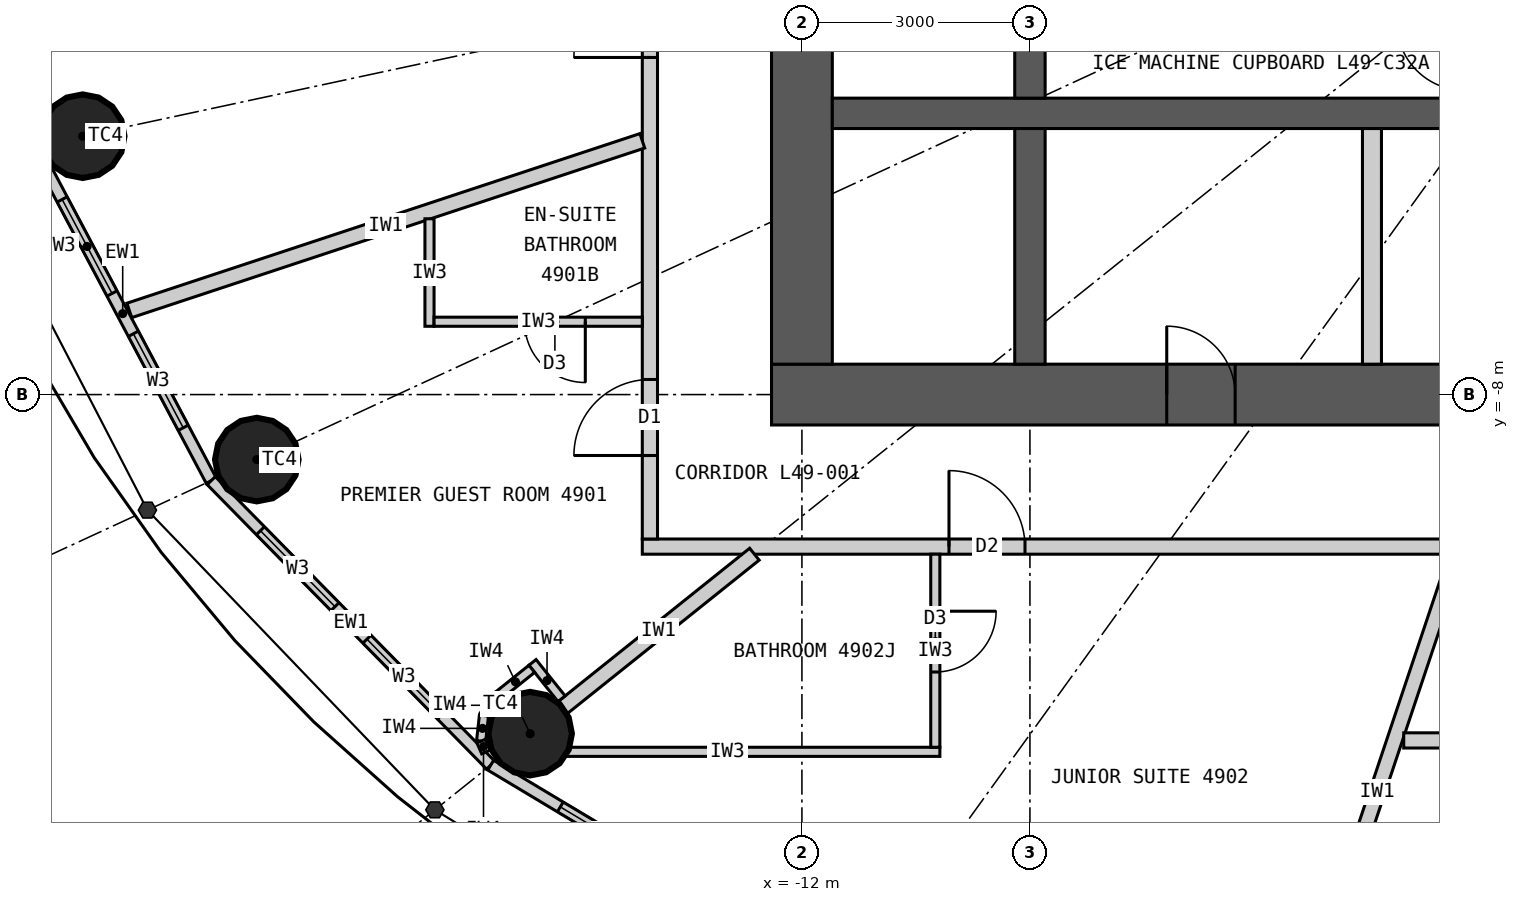
"""IFC4 building model, lengths in metres.
Left out: names, types, materials, properties, quantities, classifications, styles, units other than length and angle.
Written with IfcOpenShell. Run it as: python <this file> out.ifc"""

import sys

from ifc_helpers import new_model, si_unit, direction, frame, frame_2d, origin, origin_2d, place, context, subcontext, project, spatial, rectangle, circle, extrude, clip, halfspace, element, fill, save


model = new_model("IFC4")
c1 = context("Model", 3, precision=1e-05, world=origin(), true_north=direction((0.0, 1.0)))
c2 = subcontext(c1, "Body", "Model", "MODEL_VIEW")
j1 = project(units=[si_unit("LENGTHUNIT", "METRE"), si_unit("PLANEANGLEUNIT", "RADIAN")], contexts=[c1])
p1 = place(None, origin())
s1 = spatial("IfcSite", under=j1, at=p1, CompositionType="ELEMENT")
p2 = place(p1, origin())
s2 = spatial("IfcBuilding", under=s1, at=p2, CompositionType="ELEMENT")
p3 = place(p2, frame((0.0, 0.0, 183.0)))
s3 = spatial("IfcBuildingStorey", under=s2, at=p3, CompositionType="ELEMENT", Elevation=183.0)
for number, where, z_axis, x_axis in (
    (1, (-21.463, -4.601, 0.0), (0.0, 0.0, 1.0), (1.0, 0.0, 0.0)),
    (2, (-19.172, -8.855, 0.0), (0.0, 0.0, 1.0), (1.0, 0.0, 0.0)),
    (3, (-15.576, -12.461, 0.0), (0.0, 0.0, 1.0), (1.0, 0.0, 0.0)),
):
    element("IfcColumn", number, at=place(p3, frame(where, z_axis=z_axis, x_axis=x_axis)), inside=s3, PredefinedType="COLUMN", context=c2, shape_type="Clipping", body=[
        clip(extrude(circle(Radius=0.55, at=origin_2d()), origin(), (0.0, 0.0, 1.0), 3.3), halfspace(frame((0.0, 0.0, 2.25), z_axis=(0.0, 0.0, 1.0), x_axis=(1.0, 0.0, 0.0)), False)),
    ])
p4 = place(p3, frame((12.4, -8.0, 0.0), z_axis=(0.0, 0.0, 1.0), x_axis=(-1.0, 0.0, 0.0)))
e4 = element("IfcWall", 4, at=p4, inside=s3, PredefinedType="SHEAR", context=c2, shape_type="SweptSolid", body=[
    extrude(rectangle(XDim=24.8, YDim=0.8, at=frame_2d((12.4, 0.0))), origin(), (0.0, 0.0, 1.0), 3.3),
])
p5 = place(p4, frame((11.1, 0.0, 0.0)))
e5 = element("IfcOpeningElement", 5, at=p5, cuts=e4, PredefinedType="OPENING", context=c2, shape_type="SweptSolid", body=[
    extrude(rectangle(XDim=1.2, YDim=2.2, at=frame_2d((0.6, 1.1))), frame((0.0, 0.41, 0.0), z_axis=(0.0, -1.0, 0.0), x_axis=(1.0, 0.0, 0.0)), (0.0, 0.0, 1.0), 0.82),
])
p6 = place(p4, frame((18.7, 0.0, 0.0)))
e6 = element("IfcOpeningElement", 6, at=p6, cuts=e4, PredefinedType="OPENING", context=c2, shape_type="SweptSolid", body=[
    extrude(rectangle(XDim=0.9, YDim=2.2, at=frame_2d((0.45, 1.1))), frame((0.0, 0.41, 0.0), z_axis=(0.0, -1.0, 0.0), x_axis=(1.0, 0.0, 0.0)), (0.0, 0.0, 1.0), 0.82),
])
p7 = place(p3, frame((-12.0, 7.6, 0.0), z_axis=(0.0, 0.0, 1.0), x_axis=(0.0, -1.0, 0.0)))
e7 = element("IfcWall", 7, at=p7, inside=s3, PredefinedType="SHEAR", context=c2, shape_type="SweptSolid", body=[
    extrude(rectangle(XDim=15.2, YDim=0.8, at=frame_2d((7.6, 0.0))), origin(), (0.0, 0.0, 1.0), 3.3),
])
p8 = place(p7, frame((6.7, 0.0, 0.0)))
e8 = element("IfcOpeningElement", 8, at=p8, cuts=e7, PredefinedType="OPENING", context=c2, shape_type="SweptSolid", body=[
    extrude(rectangle(XDim=1.8, YDim=2.2, at=frame_2d((0.9, 1.1))), frame((0.0, 0.41, 0.0), z_axis=(0.0, -1.0, 0.0), x_axis=(1.0, 0.0, 0.0)), (0.0, 0.0, 1.0), 0.82),
])
p9 = place(p3, frame((-11.6, -4.3, 0.0), z_axis=(0.0, 0.0, 1.0), x_axis=(1.0, 0.0, 0.0)))
e9 = element("IfcWall", 9, at=p9, inside=s3, PredefinedType="SHEAR", context=c2, shape_type="SweptSolid", body=[
    extrude(rectangle(XDim=23.2, YDim=0.4, at=frame_2d((11.6, 0.0))), origin(), (0.0, 0.0, 1.0), 3.3),
])
p10 = place(p3, frame((-9.0, -4.1, 0.0), z_axis=(0.0, 0.0, 1.0), x_axis=(0.0, 1.0, 0.0)))
e10 = element("IfcWall", 10, at=p10, inside=s3, PredefinedType="SHEAR", context=c2, shape_type="SweptSolid", body=[
    extrude(rectangle(XDim=2.35, YDim=0.4, at=frame_2d((1.175, 0.0))), origin(), (0.0, 0.0, 1.0), 3.3),
])
p11 = place(p3, frame((-9.0, -7.6, 0.0), z_axis=(0.0, 0.0, 1.0), x_axis=(0.0, 1.0, 0.0)))
e11 = element("IfcWall", 11, at=p11, inside=s3, PredefinedType="SHEAR", context=c2, shape_type="SweptSolid", body=[
    extrude(rectangle(XDim=3.1, YDim=0.4, at=frame_2d((1.55, 0.0))), origin(), (0.0, 0.0, 1.0), 3.3),
])
p12 = place(p3, frame((-4.5, -7.6, 0.0), z_axis=(0.0, 0.0, 1.0), x_axis=(0.0, 1.0, 0.0)))
e12 = element("IfcWall", 12, at=p12, inside=s3, PredefinedType="PARTITIONING", context=c2, shape_type="SweptSolid", body=[
    extrude(rectangle(XDim=3.1, YDim=0.25, at=frame_2d((1.55, 0.0))), origin(), (0.0, 0.0, 1.0), 3.3),
])
p13 = place(p3, frame((-22.102, -4.738, 0.0), z_axis=(0.0, 0.0, 1.0), x_axis=(0.468428906714, -0.883501193748, 0.0)))
e13 = element("IfcWall", 13, at=p13, inside=s3, PredefinedType="ELEMENTEDWALL", context=c2, shape_type="SweptSolid", body=[
    extrude(rectangle(XDim=4.974, YDim=0.15, at=frame_2d((2.487, 0.0))), origin(), (0.0, 0.0, 1.0), 3.05),
])
p14 = place(p13, frame((0.787, 0.0, 0.9)))
e14 = element("IfcOpeningElement", 14, at=p14, cuts=e13, PredefinedType="OPENING", context=c2, shape_type="SweptSolid", body=[
    extrude(rectangle(XDim=1.4, YDim=1.9, at=frame_2d((0.7, 0.95))), frame((0.0, 0.085, 0.0), z_axis=(0.0, -1.0, 0.0), x_axis=(1.0, 0.0, 0.0)), (0.0, 0.0, 1.0), 0.17),
])
p15 = place(p13, frame((2.787, 0.0, 0.9)))
e15 = element("IfcOpeningElement", 15, at=p15, cuts=e13, PredefinedType="OPENING", context=c2, shape_type="SweptSolid", body=[
    extrude(rectangle(XDim=1.4, YDim=1.9, at=frame_2d((0.7, 0.95))), frame((0.0, 0.085, 0.0), z_axis=(0.0, -1.0, 0.0), x_axis=(1.0, 0.0, 0.0)), (0.0, 0.0, 1.0), 0.17),
])
p16 = place(p3, frame((-19.772, -9.132, 0.0), z_axis=(0.0, 0.0, 1.0), x_axis=(0.700727467776, -0.71342905457, 0.0)))
e16 = element("IfcWall", 16, at=p16, inside=s3, PredefinedType="ELEMENTEDWALL", context=c2, shape_type="SweptSolid", body=[
    extrude(rectangle(XDim=5.247, YDim=0.15, at=frame_2d((2.624, 0.0))), origin(), (0.0, 0.0, 1.0), 3.05),
])
p17 = place(p16, frame((0.924, 0.0, 0.9)))
e17 = element("IfcOpeningElement", 17, at=p17, cuts=e16, PredefinedType="OPENING", context=c2, shape_type="SweptSolid", body=[
    extrude(rectangle(XDim=1.4, YDim=1.9, at=frame_2d((0.7, 0.95))), frame((0.0, 0.085, 0.0), z_axis=(0.0, -1.0, 0.0), x_axis=(1.0, 0.0, 0.0)), (0.0, 0.0, 1.0), 0.17),
])
p18 = place(p16, frame((2.924, 0.0, 0.9)))
e18 = element("IfcOpeningElement", 18, at=p18, cuts=e16, PredefinedType="OPENING", context=c2, shape_type="SweptSolid", body=[
    extrude(rectangle(XDim=1.4, YDim=1.9, at=frame_2d((0.7, 0.95))), frame((0.0, 0.085, 0.0), z_axis=(0.0, -1.0, 0.0), x_axis=(1.0, 0.0, 0.0)), (0.0, 0.0, 1.0), 0.17),
])
p19 = place(p3, frame((-16.095, -12.876, 0.0), z_axis=(0.0, 0.0, 1.0), x_axis=(0.857695199231, -0.514158482587, 0.0)))
e19 = element("IfcWall", 19, at=p19, inside=s3, PredefinedType="ELEMENTEDWALL", context=c2, shape_type="SweptSolid", body=[
    extrude(rectangle(XDim=5.536, YDim=0.15, at=frame_2d((2.768, 0.0))), origin(), (0.0, 0.0, 1.0), 3.05),
])
p20 = place(p19, frame((1.068, 0.0, 0.9)))
e20 = element("IfcOpeningElement", 20, at=p20, cuts=e19, PredefinedType="OPENING", context=c2, shape_type="SweptSolid", body=[
    extrude(rectangle(XDim=1.4, YDim=1.9, at=frame_2d((0.7, 0.95))), frame((0.0, 0.085, 0.0), z_axis=(0.0, -1.0, 0.0), x_axis=(1.0, 0.0, 0.0)), (0.0, 0.0, 1.0), 0.17),
])
p21 = place(p19, frame((3.068, 0.0, 0.9)))
e21 = element("IfcOpeningElement", 21, at=p21, cuts=e19, PredefinedType="OPENING", context=c2, shape_type="SweptSolid", body=[
    extrude(rectangle(XDim=1.4, YDim=1.9, at=frame_2d((0.7, 0.95))), frame((0.0, 0.085, 0.0), z_axis=(0.0, -1.0, 0.0), x_axis=(1.0, 0.0, 0.0)), (0.0, 0.0, 1.0), 0.17),
])
p22 = place(p3, frame((14.1, -10.0, 0.0), z_axis=(0.0, 0.0, 1.0), x_axis=(-1.0, 0.0, 0.0)))
e22 = element("IfcWall", 22, at=p22, inside=s3, PredefinedType="PARTITIONING", context=c2, shape_type="SweptSolid", body=[
    extrude(rectangle(XDim=28.2, YDim=0.2, at=frame_2d((14.1, 0.0))), origin(), (0.0, 0.0, 1.0), 3.05),
])
p23 = place(p22, frame((23.165, 0.0, 0.0)))
e23 = element("IfcOpeningElement", 23, at=p23, cuts=e22, PredefinedType="OPENING", context=c2, shape_type="SweptSolid", body=[
    extrude(rectangle(XDim=1.0, YDim=2.2, at=frame_2d((0.5, 1.1))), frame((0.0, 0.11, 0.0), z_axis=(0.0, -1.0, 0.0), x_axis=(1.0, 0.0, 0.0)), (0.0, 0.0, 1.0), 0.22),
])
p24 = place(p22, frame((9.94, 0.0, 0.0)))
e24 = element("IfcOpeningElement", 24, at=p24, cuts=e22, PredefinedType="OPENING", context=c2, shape_type="SweptSolid", body=[
    extrude(rectangle(XDim=1.0, YDim=2.2, at=frame_2d((0.5, 1.1))), frame((0.0, 0.11, 0.0), z_axis=(0.0, -1.0, 0.0), x_axis=(1.0, 0.0, 0.0)), (0.0, 0.0, 1.0), 0.22),
])
p25 = place(p3, frame((-14.0, 9.9, 0.0), z_axis=(0.0, 0.0, 1.0), x_axis=(0.0, -1.0, 0.0)))
e25 = element("IfcWall", 25, at=p25, inside=s3, PredefinedType="PARTITIONING", context=c2, shape_type="SweptSolid", body=[
    extrude(rectangle(XDim=19.8, YDim=0.2, at=frame_2d((9.9, 0.0))), origin(), (0.0, 0.0, 1.0), 3.05),
])
p26 = place(p25, frame((17.701, 0.0, 0.0)))
e26 = element("IfcOpeningElement", 26, at=p26, cuts=e25, PredefinedType="OPENING", context=c2, shape_type="SweptSolid", body=[
    extrude(rectangle(XDim=1.0, YDim=2.2, at=frame_2d((0.5, 1.1))), frame((0.0, 0.11, 0.0), z_axis=(0.0, -1.0, 0.0), x_axis=(1.0, 0.0, 0.0)), (0.0, 0.0, 1.0), 0.22),
])
p27 = place(p25, frame((1.1, 0.0, 0.0)))
e27 = element("IfcOpeningElement", 27, at=p27, cuts=e25, PredefinedType="OPENING", context=c2, shape_type="SweptSolid", body=[
    extrude(rectangle(XDim=1.0, YDim=2.2, at=frame_2d((0.5, 1.1))), frame((0.0, 0.11, 0.0), z_axis=(0.0, -1.0, 0.0), x_axis=(1.0, 0.0, 0.0)), (0.0, 0.0, 1.0), 0.22),
])
p28 = place(p25, frame((6.574, 0.0, 0.0)))
e28 = element("IfcOpeningElement", 28, at=p28, cuts=e25, PredefinedType="OPENING", context=c2, shape_type="SweptSolid", body=[
    extrude(rectangle(XDim=1.0, YDim=2.2, at=frame_2d((0.5, 1.1))), frame((0.0, 0.11, 0.0), z_axis=(0.0, -1.0, 0.0), x_axis=(1.0, 0.0, 0.0)), (0.0, 0.0, 1.0), 0.22),
])
p29 = place(p25, frame((12.465, 0.0, 0.0)))
e29 = element("IfcOpeningElement", 29, at=p29, cuts=e25, PredefinedType="OPENING", context=c2, shape_type="SweptSolid", body=[
    extrude(rectangle(XDim=1.0, YDim=2.1, at=frame_2d((0.5, 1.05))), frame((0.0, 0.11, 0.0), z_axis=(0.0, -1.0, 0.0), x_axis=(1.0, 0.0, 0.0)), (0.0, 0.0, 1.0), 0.22),
])
p30 = place(p3, frame((-14.1, -4.661, 0.0), z_axis=(0.0, 0.0, 1.0), x_axis=(-0.949453216399, -0.313908569285, 0.0)))
e30 = element("IfcWall", 30, at=p30, inside=s3, PredefinedType="PARTITIONING", context=c2, shape_type="SweptSolid", body=[
    extrude(rectangle(XDim=7.109, YDim=0.2, at=frame_2d((3.554, 0.0))), origin(), (0.0, 0.0, 1.0), 3.05),
])
p31 = place(p3, frame((-12.625, -10.1, 0.0), z_axis=(0.0, 0.0, 1.0), x_axis=(-0.780876185034, -0.624685827954, 0.0)))
e31 = element("IfcWall", 31, at=p31, inside=s3, PredefinedType="PARTITIONING", context=c2, shape_type="SweptSolid", body=[
    extrude(rectangle(XDim=3.229, YDim=0.2, at=frame_2d((1.615, 0.0))), origin(), (0.0, 0.0, 1.0), 2.25),
])
p32 = place(p3, frame((-3.383, -10.1, 0.0), z_axis=(0.0, 0.0, 1.0), x_axis=(-0.317615120474, -0.948219718866, 0.0)))
e32 = element("IfcWall", 32, at=p32, inside=s3, PredefinedType="PARTITIONING", context=c2, shape_type="SweptSolid", body=[
    extrude(rectangle(XDim=6.597, YDim=0.2, at=frame_2d((3.299, 0.0))), origin(), (0.0, 0.0, 1.0), 2.15),
])
p33 = place(p3, frame((-16.9, -5.687, 0.0), z_axis=(0.0, 0.0, 1.0), x_axis=(0.0, -1.0, 0.0)))
e33 = element("IfcWall", 33, at=p33, inside=s3, PredefinedType="PARTITIONING", context=c2, shape_type="SweptSolid", body=[
    extrude(rectangle(XDim=1.414, YDim=0.12, at=frame_2d((0.707, 0.0))), origin(), (0.0, 0.0, 1.0), 3.05),
])
p34 = place(p3, frame((-14.1, -7.042, 0.0), z_axis=(0.0, 0.0, 1.0), x_axis=(-1.0, 0.0, 0.0)))
e34 = element("IfcWall", 34, at=p34, inside=s3, PredefinedType="PARTITIONING", context=c2, shape_type="SweptSolid", body=[
    extrude(rectangle(XDim=2.74, YDim=0.12, at=frame_2d((1.37, 0.0))), origin(), (0.0, 0.0, 1.0), 3.05),
])
p35 = place(p34, frame((0.75, 0.0, 0.0)))
e35 = element("IfcOpeningElement", 35, at=p35, cuts=e34, PredefinedType="OPENING", context=c2, shape_type="SweptSolid", body=[
    extrude(rectangle(XDim=0.8, YDim=2.1, at=frame_2d((0.4, 1.05))), frame((0.0, 0.07, 0.0), z_axis=(0.0, -1.0, 0.0), x_axis=(1.0, 0.0, 0.0)), (0.0, 0.0, 1.0), 0.14),
])
p36 = place(p3, frame((-15.775, -12.7, 0.0), z_axis=(0.0, 0.0, 1.0), x_axis=(1.0, 0.0, 0.0)))
e36 = element("IfcWall", 36, at=p36, inside=s3, PredefinedType="PARTITIONING", context=c2, shape_type="SweptSolid", body=[
    extrude(rectangle(XDim=5.59, YDim=0.12, at=frame_2d((2.795, 0.0))), origin(), (0.0, 0.0, 1.0), 3.05),
])
p37 = place(p3, frame((-10.245, -10.1, 0.0), z_axis=(0.0, 0.0, 1.0), x_axis=(0.0, -1.0, 0.0)))
e37 = element("IfcWall", 37, at=p37, inside=s3, PredefinedType="PARTITIONING", context=c2, shape_type="SweptSolid", body=[
    extrude(rectangle(XDim=2.54, YDim=0.12, at=frame_2d((1.27, 0.0))), origin(), (0.0, 0.0, 1.0), 3.05),
])
p38 = place(p37, frame((0.75, 0.0, 0.0)))
e38 = element("IfcOpeningElement", 38, at=p38, cuts=e37, PredefinedType="OPENING", context=c2, shape_type="SweptSolid", body=[
    extrude(rectangle(XDim=0.8, YDim=2.1, at=frame_2d((0.4, 1.05))), frame((0.0, 0.07, 0.0), z_axis=(0.0, -1.0, 0.0), x_axis=(1.0, 0.0, 0.0)), (0.0, 0.0, 1.0), 0.14),
])
p39 = place(p3, frame((-4.082, -12.55, 0.0), z_axis=(0.0, 0.0, 1.0), x_axis=(1.0, 0.0, 0.0)))
e39 = element("IfcWall", 39, at=p39, inside=s3, PredefinedType="PARTITIONING", context=c2, shape_type="SweptSolid", body=[
    extrude(rectangle(XDim=17.691, YDim=0.2, at=frame_2d((8.845, 0.0))), origin(), (0.0, 0.0, 1.0), 3.05),
])
p40 = place(p39, frame((2.449, 0.0, 0.0)))
e40 = element("IfcOpeningElement", 40, at=p40, cuts=e39, PredefinedType="OPENING", context=c2, shape_type="SweptSolid", body=[
    extrude(rectangle(XDim=0.8, YDim=2.1, at=frame_2d((0.4, 1.05))), frame((0.0, 0.11, 0.0), z_axis=(0.0, -1.0, 0.0), x_axis=(1.0, 0.0, 0.0)), (0.0, 0.0, 1.0), 0.22),
])
p41 = place(p39, frame((13.97, 0.0, 0.0)))
e41 = element("IfcOpeningElement", 41, at=p41, cuts=e39, PredefinedType="OPENING", context=c2, shape_type="SweptSolid", body=[
    extrude(rectangle(XDim=0.8, YDim=2.1, at=frame_2d((0.4, 1.05))), frame((0.0, 0.11, 0.0), z_axis=(0.0, -1.0, 0.0), x_axis=(1.0, 0.0, 0.0)), (0.0, 0.0, 1.0), 0.22),
])
p42 = place(p39, frame((8.42, 0.0, 0.0)))
e42 = element("IfcOpeningElement", 42, at=p42, cuts=e39, PredefinedType="OPENING", context=c2, shape_type="SweptSolid", body=[
    extrude(rectangle(XDim=0.9, YDim=2.1, at=frame_2d((0.45, 1.05))), frame((0.0, 0.11, 0.0), z_axis=(0.0, -1.0, 0.0), x_axis=(1.0, 0.0, 0.0)), (0.0, 0.0, 1.0), 0.22),
])
p43 = place(p3, frame((-15.162, -12.002, 0.0), z_axis=(0.0, 0.0, 1.0), x_axis=(-0.624597762427, 0.780946627607, 0.0)))
e43 = element("IfcWall", 43, at=p43, inside=s3, PredefinedType="PARTITIONING", context=c2, shape_type="SweptSolid", body=[
    extrude(rectangle(XDim=0.612, YDim=0.12, at=frame_2d((0.306, 0.0))), origin(), (0.0, 0.0, 1.0), 3.05),
])
p44 = place(p3, frame((-15.554, -11.608, 0.0), z_axis=(0.0, 0.0, 1.0), x_axis=(-0.780695577787, -0.624911525597, 0.0)))
e44 = element("IfcWall", 44, at=p44, inside=s3, PredefinedType="PARTITIONING", context=c2, shape_type="SweptSolid", body=[
    extrude(rectangle(XDim=0.55, YDim=0.12, at=frame_2d((0.275, 0.0))), origin(), (0.0, 0.0, 1.0), 3.05),
])
p45 = place(p3, frame((-15.984, -11.952, 0.0), z_axis=(0.0, 0.0, 1.0), x_axis=(-0.592335221171, -0.805691619517, 0.0)))
e45 = element("IfcWall", 45, at=p45, inside=s3, PredefinedType="PARTITIONING", context=c2, shape_type="SweptSolid", body=[
    extrude(rectangle(XDim=0.338, YDim=0.12, at=frame_2d((0.169, 0.0))), origin(), (0.0, 0.0, 1.0), 3.05),
])
p46 = place(p3, frame((-16.184, -12.224, 0.0), z_axis=(0.0, 0.0, 1.0), x_axis=(-0.110669692975, -0.993857242795, 0.0)))
e46 = element("IfcWall", 46, at=p46, inside=s3, PredefinedType="PARTITIONING", context=c2, shape_type="SweptSolid", body=[
    extrude(rectangle(XDim=0.337, YDim=0.12, at=frame_2d((0.169, 0.0))), origin(), (0.0, 0.0, 1.0), 3.05),
])
p47 = place(p3, frame((-16.221, -12.559, 0.0), z_axis=(0.0, 0.0, 1.0), x_axis=(0.401064416249, -0.916049853457, 0.0)))
e47 = element("IfcWall", 47, at=p47, inside=s3, PredefinedType="PARTITIONING", context=c2, shape_type="SweptSolid", body=[
    extrude(rectangle(XDim=0.156, YDim=0.12, at=frame_2d((0.078, 0.0))), origin(), (0.0, 0.0, 1.0), 3.05),
])
p48 = place(p14, origin())
e48 = element("IfcWindow", 48, at=p48, inside=s3, PartitioningType="SINGLE_PANEL", PredefinedType="WINDOW", context=c2, shape_type="SweptSolid", body=[
    extrude(rectangle(XDim=1.4, YDim=1.9, at=frame_2d((0.7, 0.95))), frame((0.0, 0.03, 0.0), z_axis=(0.0, -1.0, 0.0), x_axis=(1.0, 0.0, 0.0)), (0.0, 0.0, 1.0), 0.06),
])
fill(e14, e48)
p49 = place(p15, origin())
e49 = element("IfcWindow", 49, at=p49, inside=s3, PartitioningType="SINGLE_PANEL", PredefinedType="WINDOW", context=c2, shape_type="SweptSolid", body=[
    extrude(rectangle(XDim=1.4, YDim=1.9, at=frame_2d((0.7, 0.95))), frame((0.0, 0.03, 0.0), z_axis=(0.0, -1.0, 0.0), x_axis=(1.0, 0.0, 0.0)), (0.0, 0.0, 1.0), 0.06),
])
fill(e15, e49)
p50 = place(p17, origin())
e50 = element("IfcWindow", 50, at=p50, inside=s3, PartitioningType="SINGLE_PANEL", PredefinedType="WINDOW", context=c2, shape_type="SweptSolid", body=[
    extrude(rectangle(XDim=1.4, YDim=1.9, at=frame_2d((0.7, 0.95))), frame((0.0, 0.03, 0.0), z_axis=(0.0, -1.0, 0.0), x_axis=(1.0, 0.0, 0.0)), (0.0, 0.0, 1.0), 0.06),
])
fill(e17, e50)
p51 = place(p18, origin())
e51 = element("IfcWindow", 51, at=p51, inside=s3, PartitioningType="SINGLE_PANEL", PredefinedType="WINDOW", context=c2, shape_type="SweptSolid", body=[
    extrude(rectangle(XDim=1.4, YDim=1.9, at=frame_2d((0.7, 0.95))), frame((0.0, 0.03, 0.0), z_axis=(0.0, -1.0, 0.0), x_axis=(1.0, 0.0, 0.0)), (0.0, 0.0, 1.0), 0.06),
])
fill(e18, e51)
p52 = place(p20, origin())
e52 = element("IfcWindow", 52, at=p52, inside=s3, PartitioningType="SINGLE_PANEL", PredefinedType="WINDOW", context=c2, shape_type="SweptSolid", body=[
    extrude(rectangle(XDim=1.4, YDim=1.9, at=frame_2d((0.7, 0.95))), frame((0.0, 0.03, 0.0), z_axis=(0.0, -1.0, 0.0), x_axis=(1.0, 0.0, 0.0)), (0.0, 0.0, 1.0), 0.06),
])
fill(e20, e52)
p53 = place(p35, origin())
e53 = element("IfcDoor", 53, at=p53, inside=s3, OperationType="SINGLE_SWING_LEFT", PredefinedType="DOOR", context=c2, shape_type="SweptSolid", body=[
    extrude(rectangle(XDim=0.8, YDim=2.1, at=frame_2d((0.4, 1.05))), frame((0.0, 0.025, 0.0), z_axis=(0.0, -1.0, 0.0), x_axis=(1.0, 0.0, 0.0)), (0.0, 0.0, 1.0), 0.05),
])
fill(e35, e53)
p54 = place(p26, origin())
e54 = element("IfcDoor", 54, at=p54, inside=s3, OperationType="SINGLE_SWING_RIGHT", PredefinedType="DOOR", context=c2, shape_type="SweptSolid", body=[
    extrude(rectangle(XDim=1.0, YDim=2.2, at=frame_2d((0.5, 1.1))), frame((0.0, 0.025, 0.0), z_axis=(0.0, -1.0, 0.0), x_axis=(1.0, 0.0, 0.0)), (0.0, 0.0, 1.0), 0.05),
])
fill(e26, e54)
p55 = place(p38, origin())
e55 = element("IfcDoor", 55, at=p55, inside=s3, OperationType="SINGLE_SWING_LEFT", PredefinedType="DOOR", context=c2, shape_type="SweptSolid", body=[
    extrude(rectangle(XDim=0.8, YDim=2.1, at=frame_2d((0.4, 1.05))), frame((0.0, 0.025, 0.0), z_axis=(0.0, -1.0, 0.0), x_axis=(1.0, 0.0, 0.0)), (0.0, 0.0, 1.0), 0.05),
])
fill(e38, e55)
p56 = place(p23, origin())
e56 = element("IfcDoor", 56, at=p56, inside=s3, OperationType="SINGLE_SWING_RIGHT", PredefinedType="DOOR", context=c2, shape_type="SweptSolid", body=[
    extrude(rectangle(XDim=1.0, YDim=2.2, at=frame_2d((0.5, 1.1))), frame((0.0, 0.025, 0.0), z_axis=(0.0, -1.0, 0.0), x_axis=(1.0, 0.0, 0.0)), (0.0, 0.0, 1.0), 0.05),
])
fill(e23, e56)
p57 = place(p29, origin())
e57 = element("IfcDoor", 57, at=p57, inside=s3, OperationType="SINGLE_SWING_RIGHT", PredefinedType="DOOR", context=c2, shape_type="SweptSolid", body=[
    extrude(rectangle(XDim=1.0, YDim=2.1, at=frame_2d((0.5, 1.05))), frame((0.0, 0.025, 0.0), z_axis=(0.0, -1.0, 0.0), x_axis=(1.0, 0.0, 0.0)), (0.0, 0.0, 1.0), 0.05),
])
fill(e29, e57)
p58 = place(p6, origin())
e58 = element("IfcDoor", 58, at=p58, inside=s3, OperationType="SINGLE_SWING_RIGHT", PredefinedType="DOOR", context=c2, shape_type="SweptSolid", body=[
    extrude(rectangle(XDim=0.9, YDim=2.2, at=frame_2d((0.45, 1.1))), frame((0.0, 0.025, 0.0), z_axis=(0.0, -1.0, 0.0), x_axis=(1.0, 0.0, 0.0)), (0.0, 0.0, 1.0), 0.05),
])
fill(e6, e58)
save(model, sys.argv[1])
